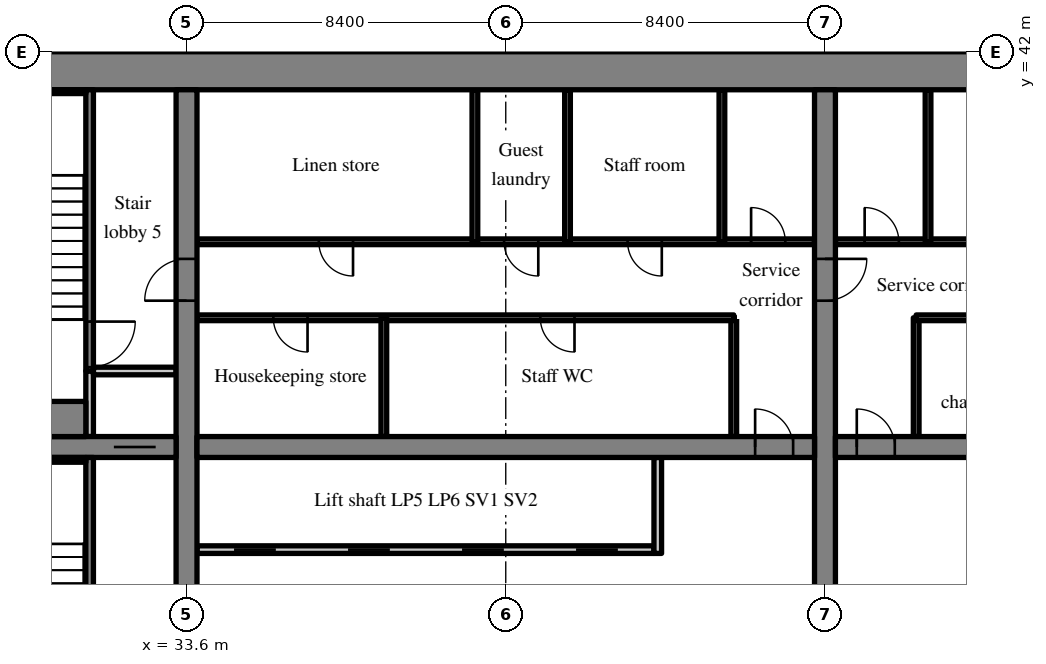
"""IFC4 building model, lengths in metres.
Left out: names, types, materials, properties, quantities, classifications, styles, units other than length and angle.
Written with IfcOpenShell. Run it as: python <this file> out.ifc"""

import sys

from ifc_helpers import new_model, si_unit, direction, frame, frame_2d, origin, place, context, subcontext, project, spatial, rectangle, extrude, source, transform, mapped, element, fill, save


model = new_model("IFC4")
c1 = context("Model", 3, precision=1e-05, world=origin(), true_north=direction((0.0, 1.0)))
c2 = subcontext(c1, "Body", "Model", "MODEL_VIEW")
j1 = project(units=[si_unit("LENGTHUNIT", "METRE"), si_unit("PLANEANGLEUNIT", "RADIAN")], contexts=[c1])
p1 = place(None, origin())
s1 = spatial("IfcSite", under=j1, at=p1, CompositionType="ELEMENT")
p2 = place(p1, origin())
s2 = spatial("IfcBuilding", under=s1, at=p2, CompositionType="ELEMENT")
p3 = place(p2, frame((0.0, 0.0, 65.8)))
s3 = spatial("IfcBuildingStorey", under=s2, at=p3, CompositionType="ELEMENT", Elevation=65.8)
m1 = source(origin(), c2, "Body", "SweptSolid", [
    extrude(rectangle(XDim=50.4, YDim=1.0, at=frame_2d((25.2, 0.0))), origin(), (0.0, 0.0, 1.0), 3.52),
])
p4 = place(p3, frame((25.2, 41.5, 0.0), z_axis=(0.0, 0.0, 1.0), x_axis=(1.0, 0.0, 0.0)))
e1 = element("IfcWall", 1, at=p4, inside=s3, PredefinedType="SHEAR", context=c2, shape_type="MappedRepresentation", body=[
    mapped(m1, transform((0.0, 0.0, 0.0), scale=1.0)),
])
m2 = source(origin(), c2, "Body", "SweptSolid", [
    extrude(rectangle(XDim=18.0, YDim=0.55, at=frame_2d((9.0, 0.0))), origin(), (0.0, 0.0, 1.0), 3.52),
])
p5 = place(p3, frame((33.6, 23.0, 0.0), z_axis=(0.0, 0.0, 1.0), x_axis=(0.0, 1.0, 0.0)))
e2 = element("IfcWall", 2, at=p5, inside=s3, PredefinedType="SHEAR", context=c2, shape_type="MappedRepresentation", body=[
    mapped(m2, transform((0.0, 0.0, 0.0), scale=1.0)),
])
m3 = source(origin(), c2, "Body", "SweptSolid", [
    extrude(rectangle(XDim=1.1, YDim=2.1, at=frame_2d((0.55, 1.05))), frame((0.0, 0.285, 0.0), z_axis=(0.0, -1.0, 0.0), x_axis=(1.0, 0.0, 0.0)), (0.0, 0.0, 1.0), 0.57),
])
p6 = place(p5, frame((12.45, 0.0, 0.0)))
e3 = element("IfcOpeningElement", 3, at=p6, cuts=e2, PredefinedType="OPENING", context=c2, shape_type="MappedRepresentation", body=[
    mapped(m3, transform((0.0, 0.0, 0.0), scale=1.0)),
])
p7 = place(p3, frame((50.4, 23.0, 0.0), z_axis=(0.0, 0.0, 1.0), x_axis=(0.0, 1.0, 0.0)))
e4 = element("IfcWall", 4, at=p7, inside=s3, PredefinedType="SHEAR", context=c2, shape_type="MappedRepresentation", body=[
    mapped(m2, transform((0.0, 0.0, 0.0), scale=1.0)),
])
p8 = place(p7, frame((12.45, 0.0, 0.0)))
e5 = element("IfcOpeningElement", 5, at=p8, cuts=e4, PredefinedType="OPENING", context=c2, shape_type="MappedRepresentation", body=[
    mapped(m3, transform((0.0, 0.0, 0.0), scale=1.0)),
])
m4 = source(origin(), c2, "Body", "SweptSolid", [
    extrude(rectangle(XDim=7.125, YDim=0.55, at=frame_2d((3.562, 0.0))), origin(), (0.0, 0.0, 1.0), 3.52),
])
p9 = place(p3, frame((26.2, 31.6, 0.0), z_axis=(0.0, 0.0, 1.0), x_axis=(1.0, 0.0, 0.0)))
e6 = element("IfcWall", 6, at=p9, inside=s3, PredefinedType="SHEAR", context=c2, shape_type="MappedRepresentation", body=[
    mapped(m4, transform((0.0, 0.0, 0.0), scale=1.0)),
])
p10 = place(p9, frame((5.488, 0.0, 0.0)))
e7 = element("IfcOpeningElement", 7, at=p10, cuts=e6, PredefinedType="OPENING", context=c2, shape_type="MappedRepresentation", body=[
    mapped(m3, transform((0.0, 0.0, 0.0), scale=1.0)),
])
m5 = source(origin(), c2, "Body", "SweptSolid", [
    extrude(rectangle(XDim=16.25, YDim=0.55, at=frame_2d((8.125, 0.0))), origin(), (0.0, 0.0, 1.0), 3.52),
])
p11 = place(p3, frame((33.875, 31.6, 0.0), z_axis=(0.0, 0.0, 1.0), x_axis=(1.0, 0.0, 0.0)))
e8 = element("IfcWall", 8, at=p11, inside=s3, PredefinedType="SHEAR", context=c2, shape_type="MappedRepresentation", body=[
    mapped(m5, transform((0.0, 0.0, 0.0), scale=1.0)),
])
m6 = source(origin(), c2, "Body", "SweptSolid", [
    extrude(rectangle(XDim=1.0, YDim=2.1, at=frame_2d((0.5, 1.05))), frame((0.0, 0.285, 0.0), z_axis=(0.0, -1.0, 0.0), x_axis=(1.0, 0.0, 0.0)), (0.0, 0.0, 1.0), 0.57),
])
p12 = place(p11, frame((14.687, 0.0, 0.0)))
e9 = element("IfcOpeningElement", 9, at=p12, cuts=e8, PredefinedType="OPENING", context=c2, shape_type="MappedRepresentation", body=[
    mapped(m6, transform((0.0, 0.0, 0.0), scale=1.0)),
])
p13 = place(p3, frame((50.675, 31.6, 0.0), z_axis=(0.0, 0.0, 1.0), x_axis=(1.0, 0.0, 0.0)))
e10 = element("IfcWall", 10, at=p13, inside=s3, PredefinedType="SHEAR", context=c2, shape_type="MappedRepresentation", body=[
    mapped(m5, transform((0.0, 0.0, 0.0), scale=1.0)),
])
p14 = place(p13, frame((0.562, 0.0, 0.0)))
e11 = element("IfcOpeningElement", 11, at=p14, cuts=e10, PredefinedType="OPENING", context=c2, shape_type="MappedRepresentation", body=[
    mapped(m6, transform((0.0, 0.0, 0.0), scale=1.0)),
])
m7 = source(origin(), c2, "Body", "SweptSolid", [
    extrude(rectangle(XDim=12.025, YDim=0.2, at=frame_2d((6.012, 0.0))), origin(), (0.0, 0.0, 1.0), 3.52),
])
p15 = place(p3, frame((33.875, 28.9, 0.0), z_axis=(0.0, 0.0, 1.0), x_axis=(1.0, 0.0, 0.0)))
e12 = element("IfcWall", 12, at=p15, inside=s3, PredefinedType="SOLIDWALL", context=c2, shape_type="MappedRepresentation", body=[
    mapped(m7, transform((0.0, 0.0, 0.0), scale=1.0)),
])
m8 = source(origin(), c2, "Body", "SweptSolid", [
    extrude(rectangle(XDim=1.1, YDim=2.1, at=frame_2d((0.55, 1.05))), frame((0.0, 0.11, 0.0), z_axis=(0.0, -1.0, 0.0), x_axis=(1.0, 0.0, 0.0)), (0.0, 0.0, 1.0), 0.22),
])
p16 = place(p15, frame((0.975, 0.0, 0.0)))
e13 = element("IfcOpeningElement", 13, at=p16, cuts=e12, PredefinedType="OPENING", context=c2, shape_type="MappedRepresentation", body=[
    mapped(m8, transform((0.0, 0.0, 0.0), scale=1.0)),
])
p17 = place(p15, frame((3.975, 0.0, 0.0)))
e14 = element("IfcOpeningElement", 14, at=p17, cuts=e12, PredefinedType="OPENING", context=c2, shape_type="MappedRepresentation", body=[
    mapped(m8, transform((0.0, 0.0, 0.0), scale=1.0)),
])
p18 = place(p15, frame((6.975, 0.0, 0.0)))
e15 = element("IfcOpeningElement", 15, at=p18, cuts=e12, PredefinedType="OPENING", context=c2, shape_type="MappedRepresentation", body=[
    mapped(m8, transform((0.0, 0.0, 0.0), scale=1.0)),
])
p19 = place(p15, frame((9.975, 0.0, 0.0)))
e16 = element("IfcOpeningElement", 16, at=p19, cuts=e12, PredefinedType="OPENING", context=c2, shape_type="MappedRepresentation", body=[
    mapped(m8, transform((0.0, 0.0, 0.0), scale=1.0)),
])
m9 = source(origin(), c2, "Body", "SweptSolid", [
    extrude(rectangle(XDim=2.525, YDim=0.2, at=frame_2d((1.262, 0.0))), origin(), (0.0, 0.0, 1.0), 3.52),
])
p20 = place(p3, frame((46.0, 28.8, 0.0), z_axis=(0.0, 0.0, 1.0), x_axis=(0.0, 1.0, 0.0)))
e17 = element("IfcWall", 17, at=p20, inside=s3, PredefinedType="SOLIDWALL", context=c2, shape_type="MappedRepresentation", body=[
    mapped(m9, transform((0.0, 0.0, 0.0), scale=1.0)),
])
m10 = source(origin(), c2, "Body", "SweptSolid", [
    extrude(rectangle(XDim=3.125, YDim=0.15, at=frame_2d((1.562, 0.0))), origin(), (0.0, 0.0, 1.0), 3.52),
])
p21 = place(p3, frame((48.0, 31.875, 0.0), z_axis=(0.0, 0.0, 1.0), x_axis=(0.0, 1.0, 0.0)))
e18 = element("IfcWall", 18, at=p21, inside=s3, PredefinedType="PARTITIONING", context=c2, shape_type="MappedRepresentation", body=[
    mapped(m10, transform((0.0, 0.0, 0.0), scale=1.0)),
])
m11 = source(origin(), c2, "Body", "SweptSolid", [
    extrude(rectangle(XDim=14.125, YDim=0.15, at=frame_2d((7.062, 0.0))), origin(), (0.0, 0.0, 1.0), 3.52),
])
p22 = place(p3, frame((33.875, 35.0, 0.0), z_axis=(0.0, 0.0, 1.0), x_axis=(1.0, 0.0, 0.0)))
e19 = element("IfcWall", 19, at=p22, inside=s3, PredefinedType="PARTITIONING", context=c2, shape_type="MappedRepresentation", body=[
    mapped(m11, transform((0.0, 0.0, 0.0), scale=1.0)),
])
m12 = source(origin(), c2, "Body", "SweptSolid", [
    extrude(rectangle(XDim=0.9, YDim=2.1, at=frame_2d((0.45, 1.05))), frame((0.0, 0.085, 0.0), z_axis=(0.0, -1.0, 0.0), x_axis=(1.0, 0.0, 0.0)), (0.0, 0.0, 1.0), 0.17),
])
p23 = place(p22, frame((2.009, 0.0, 0.0)))
e20 = element("IfcOpeningElement", 20, at=p23, cuts=e19, PredefinedType="OPENING", context=c2, shape_type="MappedRepresentation", body=[
    mapped(m12, transform((0.0, 0.0, 0.0), scale=1.0)),
])
p24 = place(p22, frame((9.034, 0.0, 0.0)))
e21 = element("IfcOpeningElement", 21, at=p24, cuts=e19, PredefinedType="OPENING", context=c2, shape_type="MappedRepresentation", body=[
    mapped(m12, transform((0.0, 0.0, 0.0), scale=1.0)),
])
m13 = source(origin(), c2, "Body", "SweptSolid", [
    extrude(rectangle(XDim=16.25, YDim=0.15, at=frame_2d((8.125, 0.0))), origin(), (0.0, 0.0, 1.0), 3.52),
])
p25 = place(p3, frame((33.875, 37.0, 0.0), z_axis=(0.0, 0.0, 1.0), x_axis=(1.0, 0.0, 0.0)))
e22 = element("IfcWall", 22, at=p25, inside=s3, PredefinedType="PARTITIONING", context=c2, shape_type="MappedRepresentation", body=[
    mapped(m13, transform((0.0, 0.0, 0.0), scale=1.0)),
])
p26 = place(p25, frame((3.206, 0.0, 0.0)))
e23 = element("IfcOpeningElement", 23, at=p26, cuts=e22, PredefinedType="OPENING", context=c2, shape_type="MappedRepresentation", body=[
    mapped(m12, transform((0.0, 0.0, 0.0), scale=1.0)),
])
p27 = place(p25, frame((8.081, 0.0, 0.0)))
e24 = element("IfcOpeningElement", 24, at=p27, cuts=e22, PredefinedType="OPENING", context=c2, shape_type="MappedRepresentation", body=[
    mapped(m12, transform((0.0, 0.0, 0.0), scale=1.0)),
])
p28 = place(p25, frame((11.331, 0.0, 0.0)))
e25 = element("IfcOpeningElement", 25, at=p28, cuts=e22, PredefinedType="OPENING", context=c2, shape_type="MappedRepresentation", body=[
    mapped(m12, transform((0.0, 0.0, 0.0), scale=1.0)),
])
p29 = place(p25, frame((14.581, 0.0, 0.0)))
e26 = element("IfcOpeningElement", 26, at=p29, cuts=e22, PredefinedType="OPENING", context=c2, shape_type="MappedRepresentation", body=[
    mapped(m12, transform((0.0, 0.0, 0.0), scale=1.0)),
])
p30 = place(p3, frame((38.792, 31.875, 0.0), z_axis=(0.0, 0.0, 1.0), x_axis=(0.0, 1.0, 0.0)))
e27 = element("IfcWall", 27, at=p30, inside=s3, PredefinedType="PARTITIONING", context=c2, shape_type="MappedRepresentation", body=[
    mapped(m10, transform((0.0, 0.0, 0.0), scale=1.0)),
])
m14 = source(origin(), c2, "Body", "SweptSolid", [
    extrude(rectangle(XDim=4.0, YDim=0.15, at=frame_2d((2.0, 0.0))), origin(), (0.0, 0.0, 1.0), 3.52),
])
for number, where, z_axis, x_axis in (
    (28, (41.188, 37.0, 0.0), (0.0, 0.0, 1.0), (0.0, 1.0, 0.0)),
    (29, (43.625, 37.0, 0.0), (0.0, 0.0, 1.0), (0.0, 1.0, 0.0)),
    (30, (47.688, 37.0, 0.0), (0.0, 0.0, 1.0), (0.0, 1.0, 0.0)),
):
    element("IfcWall", number, at=place(p3, frame(where, z_axis=z_axis, x_axis=x_axis)), inside=s3, PredefinedType="PARTITIONING", context=c2, shape_type="MappedRepresentation", body=[
        mapped(m14, transform((0.0, 0.0, 0.0), scale=1.0)),
    ])
p31 = place(p3, frame((52.8, 31.875, 0.0), z_axis=(0.0, 0.0, 1.0), x_axis=(0.0, 1.0, 0.0)))
e31 = element("IfcWall", 31, at=p31, inside=s3, PredefinedType="PARTITIONING", context=c2, shape_type="MappedRepresentation", body=[
    mapped(m10, transform((0.0, 0.0, 0.0), scale=1.0)),
])
p32 = place(p3, frame((66.925, 35.0, 0.0), z_axis=(0.0, 0.0, 1.0), x_axis=(-1.0, 0.0, 0.0)))
e32 = element("IfcWall", 32, at=p32, inside=s3, PredefinedType="PARTITIONING", context=c2, shape_type="MappedRepresentation", body=[
    mapped(m11, transform((0.0, 0.0, 0.0), scale=1.0)),
])
p33 = place(p32, frame((0.955, 0.0, 0.0)))
e33 = element("IfcOpeningElement", 33, at=p33, cuts=e32, PredefinedType="OPENING", context=c2, shape_type="MappedRepresentation", body=[
    mapped(m12, transform((0.0, 0.0, 0.0), scale=1.0)),
])
p34 = place(p32, frame((5.873, 0.0, 0.0)))
e34 = element("IfcOpeningElement", 34, at=p34, cuts=e32, PredefinedType="OPENING", context=c2, shape_type="MappedRepresentation", body=[
    mapped(m12, transform((0.0, 0.0, 0.0), scale=1.0)),
])
p35 = place(p32, frame((11.492, 0.0, 0.0)))
e35 = element("IfcOpeningElement", 35, at=p35, cuts=e32, PredefinedType="OPENING", context=c2, shape_type="MappedRepresentation", body=[
    mapped(m12, transform((0.0, 0.0, 0.0), scale=1.0)),
])
p36 = place(p3, frame((66.925, 37.0, 0.0), z_axis=(0.0, 0.0, 1.0), x_axis=(-1.0, 0.0, 0.0)))
e36 = element("IfcWall", 36, at=p36, inside=s3, PredefinedType="PARTITIONING", context=c2, shape_type="MappedRepresentation", body=[
    mapped(m13, transform((0.0, 0.0, 0.0), scale=1.0)),
])
p37 = place(p36, frame((0.769, 0.0, 0.0)))
e37 = element("IfcOpeningElement", 37, at=p37, cuts=e36, PredefinedType="OPENING", context=c2, shape_type="MappedRepresentation", body=[
    mapped(m12, transform((0.0, 0.0, 0.0), scale=1.0)),
])
p38 = place(p36, frame((3.613, 0.0, 0.0)))
e38 = element("IfcOpeningElement", 38, at=p38, cuts=e36, PredefinedType="OPENING", context=c2, shape_type="MappedRepresentation", body=[
    mapped(m12, transform((0.0, 0.0, 0.0), scale=1.0)),
])
p39 = place(p36, frame((9.3, 0.0, 0.0)))
e39 = element("IfcOpeningElement", 39, at=p39, cuts=e36, PredefinedType="OPENING", context=c2, shape_type="MappedRepresentation", body=[
    mapped(m12, transform((0.0, 0.0, 0.0), scale=1.0)),
])
p40 = place(p36, frame((14.581, 0.0, 0.0)))
e40 = element("IfcOpeningElement", 40, at=p40, cuts=e36, PredefinedType="OPENING", context=c2, shape_type="MappedRepresentation", body=[
    mapped(m12, transform((0.0, 0.0, 0.0), scale=1.0)),
])
p41 = place(p3, frame((53.112, 37.0, 0.0), z_axis=(0.0, 0.0, 1.0), x_axis=(0.0, 1.0, 0.0)))
e41 = element("IfcWall", 41, at=p41, inside=s3, PredefinedType="PARTITIONING", context=c2, shape_type="MappedRepresentation", body=[
    mapped(m14, transform((0.0, 0.0, 0.0), scale=1.0)),
])
m15 = source(origin(), c2, "Body", "SweptSolid", [
    extrude(rectangle(XDim=8.325, YDim=0.2, at=frame_2d((4.163, 0.0))), origin(), (0.0, 0.0, 1.0), 3.52),
])
p42 = place(p3, frame((31.05, 23.0, 0.0), z_axis=(0.0, 0.0, 1.0), x_axis=(0.0, 1.0, 0.0)))
e42 = element("IfcWall", 42, at=p42, inside=s3, PredefinedType="SOLIDWALL", context=c2, shape_type="MappedRepresentation", body=[
    mapped(m15, transform((0.0, 0.0, 0.0), scale=1.0)),
])
m16 = source(origin(), c2, "Body", "SweptSolid", [
    extrude(rectangle(XDim=1.2, YDim=2.1, at=frame_2d((0.6, 1.05))), frame((0.0, 0.11, 0.0), z_axis=(0.0, -1.0, 0.0), x_axis=(1.0, 0.0, 0.0)), (0.0, 0.0, 1.0), 0.22),
])
p43 = place(p42, frame((0.6, 0.0, 0.0)))
e43 = element("IfcOpeningElement", 43, at=p43, cuts=e42, PredefinedType="OPENING", context=c2, shape_type="MappedRepresentation", body=[
    mapped(m16, transform((0.0, 0.0, 0.0), scale=1.0)),
])
m17 = source(origin(), c2, "Body", "SweptSolid", [
    extrude(rectangle(XDim=1.725, YDim=0.2, at=frame_2d((0.863, 0.0))), origin(), (0.0, 0.0, 1.0), 3.52),
])
p44 = place(p3, frame((31.05, 31.875, 0.0), z_axis=(0.0, 0.0, 1.0), x_axis=(0.0, 1.0, 0.0)))
e44 = element("IfcWall", 44, at=p44, inside=s3, PredefinedType="SOLIDWALL", context=c2, shape_type="MappedRepresentation", body=[
    mapped(m17, transform((0.0, 0.0, 0.0), scale=1.0)),
])
m18 = source(origin(), c2, "Body", "SweptSolid", [
    extrude(rectangle(XDim=2.175, YDim=0.2, at=frame_2d((1.087, 0.0))), origin(), (0.0, 0.0, 1.0), 3.52),
])
p45 = place(p3, frame((31.15, 33.6, 0.0), z_axis=(0.0, 0.0, 1.0), x_axis=(1.0, 0.0, 0.0)))
e45 = element("IfcWall", 45, at=p45, inside=s3, PredefinedType="SOLIDWALL", context=c2, shape_type="MappedRepresentation", body=[
    mapped(m18, transform((0.0, 0.0, 0.0), scale=1.0)),
])
m19 = source(origin(), c2, "Body", "SweptSolid", [
    extrude(rectangle(XDim=7.4, YDim=0.2, at=frame_2d((3.7, 0.0))), origin(), (0.0, 0.0, 1.0), 3.52),
])
p46 = place(p3, frame((31.05, 33.6, 0.0), z_axis=(0.0, 0.0, 1.0), x_axis=(0.0, 1.0, 0.0)))
e46 = element("IfcWall", 46, at=p46, inside=s3, PredefinedType="SOLIDWALL", context=c2, shape_type="MappedRepresentation", body=[
    mapped(m19, transform((0.0, 0.0, 0.0), scale=1.0)),
])
p47 = place(p46, frame((0.1, 0.0, 0.0)))
e47 = element("IfcOpeningElement", 47, at=p47, cuts=e46, PredefinedType="OPENING", context=c2, shape_type="MappedRepresentation", body=[
    mapped(m16, transform((0.0, 0.0, 0.0), scale=1.0)),
])
m20 = source(origin(), c2, "Body", "SweptSolid", [
    extrude(rectangle(XDim=4.75, YDim=0.125, at=frame_2d((2.375, 0.0))), origin(), (0.0, 0.0, 1.0), 3.52),
])
p48 = place(p3, frame((26.2, 31.262, 0.0), z_axis=(0.0, 0.0, 1.0), x_axis=(1.0, 0.0, 0.0)))
e48 = element("IfcWall", 48, at=p48, inside=s3, PredefinedType="SOLIDWALL", context=c2, shape_type="MappedRepresentation", body=[
    mapped(m20, transform((0.0, 0.0, 0.0), scale=1.0)),
])
m21 = source(origin(), c2, "Body", "SweptSolid", [
    extrude(rectangle(XDim=4.75, YDim=0.1, at=frame_2d((2.375, 0.0))), origin(), (0.0, 0.0, 1.0), 3.52),
])
p49 = place(p3, frame((26.2, 40.95, 0.0), z_axis=(0.0, 0.0, 1.0), x_axis=(1.0, 0.0, 0.0)))
e49 = element("IfcWall", 49, at=p49, inside=s3, PredefinedType="SOLIDWALL", context=c2, shape_type="MappedRepresentation", body=[
    mapped(m21, transform((0.0, 0.0, 0.0), scale=1.0)),
])
m22 = source(origin(), c2, "Body", "SweptSolid", [
    extrude(rectangle(XDim=4.75, YDim=0.925, at=frame_2d((2.375, 0.0))), origin(), (0.0, 0.0, 1.0), 3.52),
])
p50 = place(p3, frame((26.2, 32.337, 0.0), z_axis=(0.0, 0.0, 1.0), x_axis=(1.0, 0.0, 0.0)))
e50 = element("IfcWall", 50, at=p50, inside=s3, PredefinedType="SOLIDWALL", context=c2, shape_type="MappedRepresentation", body=[
    mapped(m22, transform((0.0, 0.0, 0.0), scale=1.0)),
])
m23 = source(origin(), c2, "Body", "SweptSolid", [
    extrude(rectangle(XDim=1.0, YDim=2.1, at=frame_2d((0.5, 1.05))), frame((0.0, 0.025, 0.0), z_axis=(0.0, -1.0, 0.0), x_axis=(1.0, 0.0, 0.0)), (0.0, 0.0, 1.0), 0.05),
])
p51 = place(p12, origin())
e51 = element("IfcDoor", 51, at=p51, inside=s3, OperationType="SINGLE_SWING_LEFT", PredefinedType="DOOR", context=c2, shape_type="MappedRepresentation", body=[
    mapped(m23, transform((0.0, 0.0, 0.0), scale=1.0)),
])
fill(e9, e51)
m24 = source(origin(), c2, "Body", "SweptSolid", [
    extrude(rectangle(XDim=1.1, YDim=2.1, at=frame_2d((0.55, 1.05))), frame((0.0, 0.025, 0.0), z_axis=(0.0, -1.0, 0.0), x_axis=(1.0, 0.0, 0.0)), (0.0, 0.0, 1.0), 0.05),
])
p52 = place(p16, origin())
e52 = element("IfcDoor", 52, at=p52, inside=s3, OperationType="SLIDING_TO_LEFT", PredefinedType="DOOR", context=c2, shape_type="MappedRepresentation", body=[
    mapped(m24, transform((0.0, 0.0, 0.0), scale=1.0)),
])
fill(e13, e52)
p53 = place(p17, origin())
e53 = element("IfcDoor", 53, at=p53, inside=s3, OperationType="SLIDING_TO_RIGHT", PredefinedType="DOOR", context=c2, shape_type="MappedRepresentation", body=[
    mapped(m24, transform((0.0, 0.0, 0.0), scale=1.0)),
])
fill(e14, e53)
p54 = place(p18, origin())
e54 = element("IfcDoor", 54, at=p54, inside=s3, OperationType="SLIDING_TO_LEFT", PredefinedType="DOOR", context=c2, shape_type="MappedRepresentation", body=[
    mapped(m24, transform((0.0, 0.0, 0.0), scale=1.0)),
])
fill(e15, e54)
p55 = place(p19, origin())
e55 = element("IfcDoor", 55, at=p55, inside=s3, OperationType="SLIDING_TO_RIGHT", PredefinedType="DOOR", context=c2, shape_type="MappedRepresentation", body=[
    mapped(m24, transform((0.0, 0.0, 0.0), scale=1.0)),
])
fill(e16, e55)
m25 = source(origin(), c2, "Body", "SweptSolid", [
    extrude(rectangle(XDim=0.9, YDim=2.1, at=frame_2d((0.45, 1.05))), frame((0.0, 0.025, 0.0), z_axis=(0.0, -1.0, 0.0), x_axis=(1.0, 0.0, 0.0)), (0.0, 0.0, 1.0), 0.05),
])
p56 = place(p23, origin())
e56 = element("IfcDoor", 56, at=p56, inside=s3, OperationType="SINGLE_SWING_RIGHT", PredefinedType="DOOR", context=c2, shape_type="MappedRepresentation", body=[
    mapped(m25, transform((0.0, 0.0, 0.0), scale=1.0)),
])
fill(e20, e56)
p57 = place(p24, origin())
e57 = element("IfcDoor", 57, at=p57, inside=s3, OperationType="SINGLE_SWING_RIGHT", PredefinedType="DOOR", context=c2, shape_type="MappedRepresentation", body=[
    mapped(m25, transform((0.0, 0.0, 0.0), scale=1.0)),
])
fill(e21, e57)
p58 = place(p26, origin())
e58 = element("IfcDoor", 58, at=p58, inside=s3, OperationType="SINGLE_SWING_RIGHT", PredefinedType="DOOR", context=c2, shape_type="MappedRepresentation", body=[
    mapped(m25, transform((0.0, 0.0, 0.0), scale=1.0)),
])
fill(e23, e58)
p59 = place(p27, origin())
e59 = element("IfcDoor", 59, at=p59, inside=s3, OperationType="SINGLE_SWING_RIGHT", PredefinedType="DOOR", context=c2, shape_type="MappedRepresentation", body=[
    mapped(m25, transform((0.0, 0.0, 0.0), scale=1.0)),
])
fill(e24, e59)
p60 = place(p28, origin())
e60 = element("IfcDoor", 60, at=p60, inside=s3, OperationType="SINGLE_SWING_RIGHT", PredefinedType="DOOR", context=c2, shape_type="MappedRepresentation", body=[
    mapped(m25, transform((0.0, 0.0, 0.0), scale=1.0)),
])
fill(e25, e60)
p61 = place(p29, origin())
e61 = element("IfcDoor", 61, at=p61, inside=s3, OperationType="SINGLE_SWING_LEFT", PredefinedType="DOOR", context=c2, shape_type="MappedRepresentation", body=[
    mapped(m25, transform((0.0, 0.0, 0.0), scale=1.0)),
])
fill(e26, e61)
p62 = place(p14, origin())
e62 = element("IfcDoor", 62, at=p62, inside=s3, OperationType="SINGLE_SWING_LEFT", PredefinedType="DOOR", context=c2, shape_type="MappedRepresentation", body=[
    mapped(m23, transform((0.0, 0.0, 0.0), scale=1.0)),
])
fill(e11, e62)
p63 = place(p40, origin())
e63 = element("IfcDoor", 63, at=p63, inside=s3, OperationType="SINGLE_SWING_RIGHT", PredefinedType="DOOR", context=c2, shape_type="MappedRepresentation", body=[
    mapped(m25, transform((0.0, 0.0, 0.0), scale=1.0)),
])
fill(e40, e63)
p64 = place(p10, origin())
e64 = element("IfcDoor", 64, at=p64, inside=s3, OperationType="SLIDING_TO_RIGHT", PredefinedType="DOOR", context=c2, shape_type="MappedRepresentation", body=[
    mapped(m24, transform((0.0, 0.0, 0.0), scale=1.0)),
])
fill(e7, e64)
m26 = source(origin(), c2, "Body", "SweptSolid", [
    extrude(rectangle(XDim=1.2, YDim=2.1, at=frame_2d((0.6, 1.05))), frame((0.0, 0.025, 0.0), z_axis=(0.0, -1.0, 0.0), x_axis=(1.0, 0.0, 0.0)), (0.0, 0.0, 1.0), 0.05),
])
p65 = place(p47, origin())
e65 = element("IfcDoor", 65, at=p65, inside=s3, OperationType="SINGLE_SWING_RIGHT", PredefinedType="DOOR", context=c2, shape_type="MappedRepresentation", body=[
    mapped(m26, transform((0.0, 0.0, 0.0), scale=1.0)),
])
fill(e47, e65)
p66 = place(p6, origin())
e66 = element("IfcDoor", 66, at=p66, inside=s3, OperationType="SINGLE_SWING_LEFT", PredefinedType="DOOR", context=c2, shape_type="MappedRepresentation", body=[
    mapped(m24, transform((0.0, 0.0, 0.0), scale=1.0)),
])
fill(e3, e66)
p67 = place(p8, origin())
e67 = element("IfcDoor", 67, at=p67, inside=s3, OperationType="SINGLE_SWING_RIGHT", PredefinedType="DOOR", context=c2, shape_type="MappedRepresentation", body=[
    mapped(m24, transform((0.0, 0.0, 0.0), scale=1.0)),
])
fill(e5, e67)
save(model, sys.argv[1])
